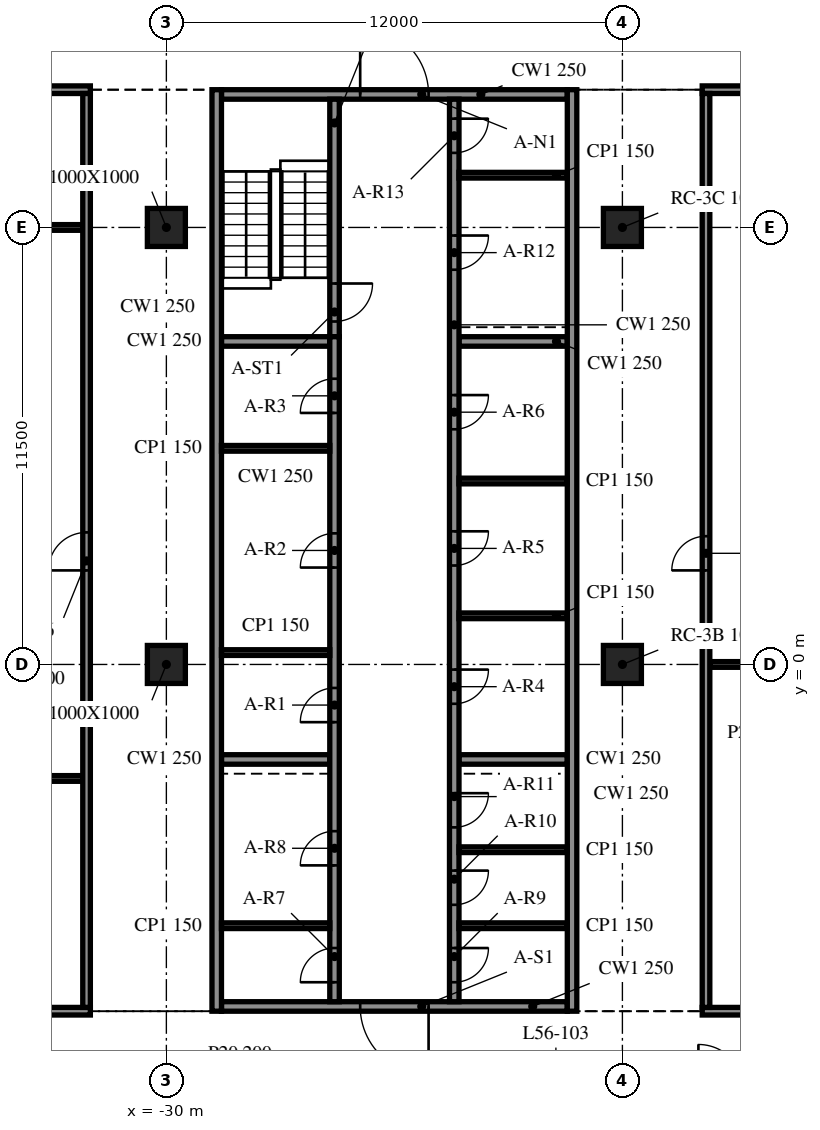
"""IFC4 building model, lengths in metres.
Left out: names, types, materials, properties, quantities, classifications, styles, units other than length and angle.
Written with IfcOpenShell. Run it as: python <this file> out.ifc"""

import sys

from ifc_helpers import new_model, si_unit, direction, frame, frame_2d, origin, origin_2d, place, context, subcontext, project, spatial, rectangle, extrude, element, fill, save


model = new_model("IFC4")
c1 = context("Model", 3, precision=1e-05, world=origin(), true_north=direction((0.0, 1.0)))
c2 = subcontext(c1, "Body", "Model", "MODEL_VIEW")
j1 = project(units=[si_unit("LENGTHUNIT", "METRE"), si_unit("PLANEANGLEUNIT", "RADIAN")], contexts=[c1])
p1 = place(None, origin())
s1 = spatial("IfcSite", under=j1, at=p1, CompositionType="ELEMENT")
p2 = place(p1, origin())
s2 = spatial("IfcBuilding", under=s1, at=p2, CompositionType="ELEMENT")
p3 = place(p2, frame((0.0, 0.0, 232.4)))
s3 = spatial("IfcBuildingStorey", under=s2, at=p3, CompositionType="ELEMENT", Elevation=232.4)
for number, where, z_axis, x_axis in (
    (1, (-30.0, 0.0, -0.34), (0.0, 0.0, 1.0), (1.0, 0.0, 0.0)),
    (2, (-30.0, 11.5, -0.34), (0.0, 0.0, 1.0), (1.0, 0.0, 0.0)),
    (3, (-18.0, 0.0, -0.34), (0.0, 0.0, 1.0), (1.0, 0.0, 0.0)),
    (4, (-18.0, 11.5, -0.34), (0.0, 0.0, 1.0), (1.0, 0.0, 0.0)),
):
    element("IfcColumn", number, at=place(p3, frame(where, z_axis=z_axis, x_axis=x_axis)), inside=s3, PredefinedType="COLUMN", context=c2, shape_type="SweptSolid", body=[
        extrude(rectangle(XDim=1.0, YDim=1.0, at=origin_2d()), origin(), (0.0, 0.0, 1.0), 3.8),
    ])
for number, where, z_axis, x_axis in (
    (5, (-28.675, 15.125, 0.0), (0.0, 0.0, 1.0), (0.0, -1.0, 0.0)),
    (6, (-19.325, -9.125, 0.0), (0.0, 0.0, 1.0), (0.0, 1.0, 0.0)),
):
    element("IfcWall", number, at=place(p3, frame(where, z_axis=z_axis, x_axis=x_axis)), inside=s3, PredefinedType="SOLIDWALL", context=c2, shape_type="SweptSolid", body=[
        extrude(rectangle(XDim=24.25, YDim=0.25, at=frame_2d((12.125, 0.0))), origin(), (0.0, 0.0, 1.0), 3.46),
    ])
p4 = place(p3, frame((-19.45, -9.0, 0.0), z_axis=(0.0, 0.0, 1.0), x_axis=(-1.0, 0.0, 0.0)))
e7 = element("IfcWall", 7, at=p4, inside=s3, PredefinedType="SOLIDWALL", context=c2, shape_type="SweptSolid", body=[
    extrude(rectangle(XDim=9.1, YDim=0.25, at=frame_2d((4.55, 0.0))), origin(), (0.0, 0.0, 1.0), 3.46),
])
p5 = place(p4, frame((3.65, 0.0, 0.0)))
e8 = element("IfcOpeningElement", 8, at=p5, cuts=e7, PredefinedType="OPENING", context=c2, shape_type="SweptSolid", body=[
    extrude(rectangle(XDim=1.8, YDim=2.1, at=frame_2d((0.9, 1.05))), frame((0.0, 0.135, 0.0), z_axis=(0.0, -1.0, 0.0), x_axis=(1.0, 0.0, 0.0)), (0.0, 0.0, 1.0), 0.27),
])
p6 = place(p3, frame((-28.55, 15.0, 0.0), z_axis=(0.0, 0.0, 1.0), x_axis=(1.0, 0.0, 0.0)))
e9 = element("IfcWall", 9, at=p6, inside=s3, PredefinedType="SOLIDWALL", context=c2, shape_type="SweptSolid", body=[
    extrude(rectangle(XDim=9.1, YDim=0.25, at=frame_2d((4.55, 0.0))), origin(), (0.0, 0.0, 1.0), 3.46),
])
p7 = place(p6, frame((3.65, 0.0, 0.0)))
e10 = element("IfcOpeningElement", 10, at=p7, cuts=e9, PredefinedType="OPENING", context=c2, shape_type="SweptSolid", body=[
    extrude(rectangle(XDim=1.8, YDim=2.1, at=frame_2d((0.9, 1.05))), frame((0.0, 0.135, 0.0), z_axis=(0.0, -1.0, 0.0), x_axis=(1.0, 0.0, 0.0)), (0.0, 0.0, 1.0), 0.27),
])
p8 = place(p3, frame((-25.575, -8.875, 0.0), z_axis=(0.0, 0.0, 1.0), x_axis=(0.0, 1.0, 0.0)))
e11 = element("IfcWall", 11, at=p8, inside=s3, PredefinedType="SOLIDWALL", context=c2, shape_type="SweptSolid", body=[
    extrude(rectangle(XDim=17.5, YDim=0.25, at=frame_2d((8.75, 0.0))), origin(), (0.0, 0.0, 1.0), 3.46),
])
p9 = place(p8, frame((7.356, 0.0, 0.0)))
e12 = element("IfcOpeningElement", 12, at=p9, cuts=e11, PredefinedType="OPENING", context=c2, shape_type="SweptSolid", body=[
    extrude(rectangle(XDim=0.9, YDim=2.1, at=frame_2d((0.45, 1.05))), frame((0.0, 0.135, 0.0), z_axis=(0.0, -1.0, 0.0), x_axis=(1.0, 0.0, 0.0)), (0.0, 0.0, 1.0), 0.27),
])
p10 = place(p8, frame((11.425, 0.0, 0.0)))
e13 = element("IfcOpeningElement", 13, at=p10, cuts=e11, PredefinedType="OPENING", context=c2, shape_type="SweptSolid", body=[
    extrude(rectangle(XDim=0.9, YDim=2.1, at=frame_2d((0.45, 1.05))), frame((0.0, 0.135, 0.0), z_axis=(0.0, -1.0, 0.0), x_axis=(1.0, 0.0, 0.0)), (0.0, 0.0, 1.0), 0.27),
])
p11 = place(p8, frame((15.494, 0.0, 0.0)))
e14 = element("IfcOpeningElement", 14, at=p11, cuts=e11, PredefinedType="OPENING", context=c2, shape_type="SweptSolid", body=[
    extrude(rectangle(XDim=0.9, YDim=2.1, at=frame_2d((0.45, 1.05))), frame((0.0, 0.135, 0.0), z_axis=(0.0, -1.0, 0.0), x_axis=(1.0, 0.0, 0.0)), (0.0, 0.0, 1.0), 0.27),
])
p12 = place(p8, frame((0.512, 0.0, 0.0)))
e15 = element("IfcOpeningElement", 15, at=p12, cuts=e11, PredefinedType="OPENING", context=c2, shape_type="SweptSolid", body=[
    extrude(rectangle(XDim=0.9, YDim=2.1, at=frame_2d((0.45, 1.05))), frame((0.0, 0.135, 0.0), z_axis=(0.0, -1.0, 0.0), x_axis=(1.0, 0.0, 0.0)), (0.0, 0.0, 1.0), 0.27),
])
p13 = place(p8, frame((3.587, 0.0, 0.0)))
e16 = element("IfcOpeningElement", 16, at=p13, cuts=e11, PredefinedType="OPENING", context=c2, shape_type="SweptSolid", body=[
    extrude(rectangle(XDim=0.9, YDim=2.1, at=frame_2d((0.45, 1.05))), frame((0.0, 0.135, 0.0), z_axis=(0.0, -1.0, 0.0), x_axis=(1.0, 0.0, 0.0)), (0.0, 0.0, 1.0), 0.27),
])
p14 = place(p3, frame((-25.575, 14.875, 0.0), z_axis=(0.0, 0.0, 1.0), x_axis=(0.0, -1.0, 0.0)))
e17 = element("IfcWall", 17, at=p14, inside=s3, PredefinedType="SOLIDWALL", context=c2, shape_type="SweptSolid", body=[
    extrude(rectangle(XDim=6.25, YDim=0.25, at=frame_2d((3.125, 0.0))), origin(), (0.0, 0.0, 1.0), 3.46),
])
p15 = place(p14, frame((4.85, 0.0, 0.0)))
e18 = element("IfcOpeningElement", 18, at=p15, cuts=e17, PredefinedType="OPENING", context=c2, shape_type="SweptSolid", body=[
    extrude(rectangle(XDim=1.0, YDim=2.1, at=frame_2d((0.5, 1.05))), frame((0.0, 0.135, 0.0), z_axis=(0.0, -1.0, 0.0), x_axis=(1.0, 0.0, 0.0)), (0.0, 0.0, 1.0), 0.27),
])
p16 = place(p3, frame((-22.425, 14.875, 0.0), z_axis=(0.0, 0.0, 1.0), x_axis=(0.0, -1.0, 0.0)))
e19 = element("IfcWall", 19, at=p16, inside=s3, PredefinedType="SOLIDWALL", context=c2, shape_type="SweptSolid", body=[
    extrude(rectangle(XDim=23.75, YDim=0.25, at=frame_2d((11.875, 0.0))), origin(), (0.0, 0.0, 1.0), 3.46),
])
p17 = place(p16, frame((15.01, 0.0, 0.0)))
e20 = element("IfcOpeningElement", 20, at=p17, cuts=e19, PredefinedType="OPENING", context=c2, shape_type="SweptSolid", body=[
    extrude(rectangle(XDim=0.9, YDim=2.1, at=frame_2d((0.45, 1.05))), frame((0.0, 0.135, 0.0), z_axis=(0.0, -1.0, 0.0), x_axis=(1.0, 0.0, 0.0)), (0.0, 0.0, 1.0), 0.27),
])
p18 = place(p16, frame((11.371, 0.0, 0.0)))
e21 = element("IfcOpeningElement", 21, at=p18, cuts=e19, PredefinedType="OPENING", context=c2, shape_type="SweptSolid", body=[
    extrude(rectangle(XDim=0.9, YDim=2.1, at=frame_2d((0.45, 1.05))), frame((0.0, 0.135, 0.0), z_axis=(0.0, -1.0, 0.0), x_axis=(1.0, 0.0, 0.0)), (0.0, 0.0, 1.0), 0.27),
])
p19 = place(p16, frame((7.786, 0.0, 0.0)))
e22 = element("IfcOpeningElement", 22, at=p19, cuts=e19, PredefinedType="OPENING", context=c2, shape_type="SweptSolid", body=[
    extrude(rectangle(XDim=0.9, YDim=2.1, at=frame_2d((0.45, 1.05))), frame((0.0, 0.135, 0.0), z_axis=(0.0, -1.0, 0.0), x_axis=(1.0, 0.0, 0.0)), (0.0, 0.0, 1.0), 0.27),
])
p20 = place(p16, frame((22.337, 0.0, 0.0)))
e23 = element("IfcOpeningElement", 23, at=p20, cuts=e19, PredefinedType="OPENING", context=c2, shape_type="SweptSolid", body=[
    extrude(rectangle(XDim=0.9, YDim=2.1, at=frame_2d((0.45, 1.05))), frame((0.0, 0.135, 0.0), z_axis=(0.0, -1.0, 0.0), x_axis=(1.0, 0.0, 0.0)), (0.0, 0.0, 1.0), 0.27),
])
p21 = place(p16, frame((20.3, 0.0, 0.0)))
e24 = element("IfcOpeningElement", 24, at=p21, cuts=e19, PredefinedType="OPENING", context=c2, shape_type="SweptSolid", body=[
    extrude(rectangle(XDim=0.9, YDim=2.1, at=frame_2d((0.45, 1.05))), frame((0.0, 0.135, 0.0), z_axis=(0.0, -1.0, 0.0), x_axis=(1.0, 0.0, 0.0)), (0.0, 0.0, 1.0), 0.27),
])
p22 = place(p16, frame((18.262, 0.0, 0.0)))
e25 = element("IfcOpeningElement", 25, at=p22, cuts=e19, PredefinedType="OPENING", context=c2, shape_type="SweptSolid", body=[
    extrude(rectangle(XDim=0.9, YDim=2.1, at=frame_2d((0.45, 1.05))), frame((0.0, 0.135, 0.0), z_axis=(0.0, -1.0, 0.0), x_axis=(1.0, 0.0, 0.0)), (0.0, 0.0, 1.0), 0.27),
])
p23 = place(p16, frame((3.587, 0.0, 0.0)))
e26 = element("IfcOpeningElement", 26, at=p23, cuts=e19, PredefinedType="OPENING", context=c2, shape_type="SweptSolid", body=[
    extrude(rectangle(XDim=0.9, YDim=2.1, at=frame_2d((0.45, 1.05))), frame((0.0, 0.135, 0.0), z_axis=(0.0, -1.0, 0.0), x_axis=(1.0, 0.0, 0.0)), (0.0, 0.0, 1.0), 0.27),
])
p24 = place(p16, frame((0.512, 0.0, 0.0)))
e27 = element("IfcOpeningElement", 27, at=p24, cuts=e19, PredefinedType="OPENING", context=c2, shape_type="SweptSolid", body=[
    extrude(rectangle(XDim=0.9, YDim=2.1, at=frame_2d((0.45, 1.05))), frame((0.0, 0.135, 0.0), z_axis=(0.0, -1.0, 0.0), x_axis=(1.0, 0.0, 0.0)), (0.0, 0.0, 1.0), 0.27),
])
for number, where, z_axis, x_axis in (
    (28, (-28.55, -2.5, 0.0), (0.0, 0.0, 1.0), (1.0, 0.0, 0.0)),
    (29, (-28.55, 8.5, 0.0), (0.0, 0.0, 1.0), (1.0, 0.0, 0.0)),
    (30, (-22.3, -2.5, 0.0), (0.0, 0.0, 1.0), (1.0, 0.0, 0.0)),
    (31, (-22.3, 8.5, 0.0), (0.0, 0.0, 1.0), (1.0, 0.0, 0.0)),
):
    element("IfcWall", number, at=place(p3, frame(where, z_axis=z_axis, x_axis=x_axis)), inside=s3, PredefinedType="SOLIDWALL", context=c2, shape_type="SweptSolid", body=[
        extrude(rectangle(XDim=2.85, YDim=0.25, at=frame_2d((1.425, 0.0))), origin(), (0.0, 0.0, 1.0), 3.46),
    ])
for number, where, z_axis, x_axis in (
    (32, (-28.55, 0.312, 0.0), (0.0, 0.0, 1.0), (1.0, 0.0, 0.0)),
    (33, (-28.55, 5.688, 0.0), (0.0, 0.0, 1.0), (1.0, 0.0, 0.0)),
    (34, (-22.3, 1.28, 0.0), (0.0, 0.0, 1.0), (1.0, 0.0, 0.0)),
    (35, (-22.3, 4.827, 0.0), (0.0, 0.0, 1.0), (1.0, 0.0, 0.0)),
    (36, (-28.55, -6.875, 0.0), (0.0, 0.0, 1.0), (1.0, 0.0, 0.0)),
    (37, (-22.3, -6.875, 0.0), (0.0, 0.0, 1.0), (1.0, 0.0, 0.0)),
    (38, (-22.3, -4.875, 0.0), (0.0, 0.0, 1.0), (1.0, 0.0, 0.0)),
    (39, (-22.3, 12.875, 0.0), (0.0, 0.0, 1.0), (1.0, 0.0, 0.0)),
):
    element("IfcWall", number, at=place(p3, frame(where, z_axis=z_axis, x_axis=x_axis)), inside=s3, PredefinedType="PARTITIONING", context=c2, shape_type="SweptSolid", body=[
        extrude(rectangle(XDim=2.85, YDim=0.15, at=frame_2d((1.425, 0.0))), origin(), (0.0, 0.0, 1.0), 3.46),
    ])
p25 = place(p3, frame((-41.975, -9.125, 0.0), z_axis=(0.0, 0.0, 1.0), x_axis=(1.0, 0.0, 0.0)))
e40 = element("IfcWall", 40, at=p25, inside=s3, PredefinedType="PARTITIONING", context=c2, shape_type="SweptSolid", body=[
    extrude(rectangle(XDim=9.975, YDim=0.2, at=frame_2d((4.988, 0.0))), origin(), (0.0, 0.0, 1.0), 3.46),
])
p26 = place(p25, frame((4.5, 0.0, 0.0)))
e41 = element("IfcOpeningElement", 41, at=p26, cuts=e40, PredefinedType="OPENING", context=c2, shape_type="SweptSolid", body=[
    extrude(rectangle(XDim=1.0, YDim=2.1, at=frame_2d((0.5, 1.05))), frame((0.0, 0.11, 0.0), z_axis=(0.0, -1.0, 0.0), x_axis=(1.0, 0.0, 0.0)), (0.0, 0.0, 1.0), 0.22),
])
p27 = place(p3, frame((-15.9, -9.125, 0.0), z_axis=(0.0, 0.0, 1.0), x_axis=(1.0, 0.0, 0.0)))
e42 = element("IfcWall", 42, at=p27, inside=s3, PredefinedType="PARTITIONING", context=c2, shape_type="SweptSolid", body=[
    extrude(rectangle(XDim=7.7, YDim=0.2, at=frame_2d((3.85, 0.0))), origin(), (0.0, 0.0, 1.0), 3.46),
])
p28 = place(p27, frame((3.3, 0.0, 0.0)))
e43 = element("IfcOpeningElement", 43, at=p28, cuts=e42, PredefinedType="OPENING", context=c2, shape_type="SweptSolid", body=[
    extrude(rectangle(XDim=0.9, YDim=2.1, at=frame_2d((0.45, 1.05))), frame((0.0, 0.11, 0.0), z_axis=(0.0, -1.0, 0.0), x_axis=(1.0, 0.0, 0.0)), (0.0, 0.0, 1.0), 0.22),
])
p29 = place(p3, frame((-41.975, -3.0, 0.0), z_axis=(0.0, 0.0, 1.0), x_axis=(1.0, 0.0, 0.0)))
e44 = element("IfcWall", 44, at=p29, inside=s3, PredefinedType="PARTITIONING", context=c2, shape_type="SweptSolid", body=[
    extrude(rectangle(XDim=9.775, YDim=0.15, at=frame_2d((4.888, 0.0))), origin(), (0.0, 0.0, 1.0), 3.46),
])
p30 = place(p3, frame((-15.7, 0.0, 0.0), z_axis=(0.0, 0.0, 1.0), x_axis=(1.0, 0.0, 0.0)))
e45 = element("IfcWall", 45, at=p30, inside=s3, PredefinedType="PARTITIONING", context=c2, shape_type="SweptSolid", body=[
    extrude(rectangle(XDim=7.3, YDim=0.15, at=frame_2d((3.65, 0.0))), origin(), (0.0, 0.0, 1.0), 3.46),
])
p31 = place(p3, frame((-41.5, 11.5, 0.0), z_axis=(0.0, 0.0, 1.0), x_axis=(1.0, 0.0, 0.0)))
e46 = element("IfcWall", 46, at=p31, inside=s3, PredefinedType="PARTITIONING", context=c2, shape_type="SweptSolid", body=[
    extrude(rectangle(XDim=9.3, YDim=0.15, at=frame_2d((4.65, 0.0))), origin(), (0.0, 0.0, 1.0), 3.46),
])
p32 = place(p3, frame((-41.975, 15.125, 0.0), z_axis=(0.0, 0.0, 1.0), x_axis=(1.0, 0.0, 0.0)))
e47 = element("IfcWall", 47, at=p32, inside=s3, PredefinedType="PARTITIONING", context=c2, shape_type="SweptSolid", body=[
    extrude(rectangle(XDim=9.975, YDim=0.2, at=frame_2d((4.988, 0.0))), origin(), (0.0, 0.0, 1.0), 3.46),
])
p33 = place(p32, frame((4.5, 0.0, 0.0)))
e48 = element("IfcOpeningElement", 48, at=p33, cuts=e47, PredefinedType="OPENING", context=c2, shape_type="SweptSolid", body=[
    extrude(rectangle(XDim=0.9, YDim=2.1, at=frame_2d((0.45, 1.05))), frame((0.0, 0.11, 0.0), z_axis=(0.0, -1.0, 0.0), x_axis=(1.0, 0.0, 0.0)), (0.0, 0.0, 1.0), 0.22),
])
p34 = place(p3, frame((-15.9, 15.125, 0.0), z_axis=(0.0, 0.0, 1.0), x_axis=(1.0, 0.0, 0.0)))
e49 = element("IfcWall", 49, at=p34, inside=s3, PredefinedType="PARTITIONING", context=c2, shape_type="SweptSolid", body=[
    extrude(rectangle(XDim=7.7, YDim=0.2, at=frame_2d((3.85, 0.0))), origin(), (0.0, 0.0, 1.0), 3.46),
])
p35 = place(p3, frame((-32.1, -9.025, 0.0), z_axis=(0.0, 0.0, 1.0), x_axis=(0.0, 1.0, 0.0)))
e50 = element("IfcWall", 50, at=p35, inside=s3, PredefinedType="PARTITIONING", context=c2, shape_type="SweptSolid", body=[
    extrude(rectangle(XDim=24.05, YDim=0.2, at=frame_2d((12.025, 0.0))), origin(), (0.0, 0.0, 1.0), 3.46),
])
p36 = place(p35, frame((11.5, 0.0, 0.0)))
e51 = element("IfcOpeningElement", 51, at=p36, cuts=e50, PredefinedType="OPENING", context=c2, shape_type="SweptSolid", body=[
    extrude(rectangle(XDim=1.0, YDim=2.1, at=frame_2d((0.5, 1.05))), frame((0.0, 0.11, 0.0), z_axis=(0.0, -1.0, 0.0), x_axis=(1.0, 0.0, 0.0)), (0.0, 0.0, 1.0), 0.22),
])
p37 = place(p3, frame((-15.8, -9.025, 0.0), z_axis=(0.0, 0.0, 1.0), x_axis=(0.0, 1.0, 0.0)))
e52 = element("IfcWall", 52, at=p37, inside=s3, PredefinedType="PARTITIONING", context=c2, shape_type="SweptSolid", body=[
    extrude(rectangle(XDim=24.05, YDim=0.2, at=frame_2d((12.025, 0.0))), origin(), (0.0, 0.0, 1.0), 3.46),
])
p38 = place(p37, frame((11.5, 0.0, 0.0)))
e53 = element("IfcOpeningElement", 53, at=p38, cuts=e52, PredefinedType="OPENING", context=c2, shape_type="SweptSolid", body=[
    extrude(rectangle(XDim=0.9, YDim=2.1, at=frame_2d((0.45, 1.05))), frame((0.0, 0.11, 0.0), z_axis=(0.0, -1.0, 0.0), x_axis=(1.0, 0.0, 0.0)), (0.0, 0.0, 1.0), 0.22),
])
p39 = place(p5, origin())
e54 = element("IfcDoor", 54, at=p39, inside=s3, OperationType="DOUBLE_DOOR_SINGLE_SWING", PredefinedType="DOOR", context=c2, shape_type="SweptSolid", body=[
    extrude(rectangle(XDim=1.8, YDim=2.1, at=frame_2d((0.9, 1.05))), frame((0.0, 0.025, 0.0), z_axis=(0.0, -1.0, 0.0), x_axis=(1.0, 0.0, 0.0)), (0.0, 0.0, 1.0), 0.05),
])
fill(e8, e54)
p40 = place(p7, origin())
e55 = element("IfcDoor", 55, at=p40, inside=s3, OperationType="DOUBLE_DOOR_SINGLE_SWING", PredefinedType="DOOR", context=c2, shape_type="SweptSolid", body=[
    extrude(rectangle(XDim=1.8, YDim=2.1, at=frame_2d((0.9, 1.05))), frame((0.0, 0.025, 0.0), z_axis=(0.0, -1.0, 0.0), x_axis=(1.0, 0.0, 0.0)), (0.0, 0.0, 1.0), 0.05),
])
fill(e10, e55)
p41 = place(p9, origin())
e56 = element("IfcDoor", 56, at=p41, inside=s3, OperationType="SINGLE_SWING_LEFT", PredefinedType="DOOR", context=c2, shape_type="SweptSolid", body=[
    extrude(rectangle(XDim=0.9, YDim=2.1, at=frame_2d((0.45, 1.05))), frame((0.0, 0.025, 0.0), z_axis=(0.0, -1.0, 0.0), x_axis=(1.0, 0.0, 0.0)), (0.0, 0.0, 1.0), 0.05),
])
fill(e12, e56)
p42 = place(p10, origin())
e57 = element("IfcDoor", 57, at=p42, inside=s3, OperationType="SINGLE_SWING_RIGHT", PredefinedType="DOOR", context=c2, shape_type="SweptSolid", body=[
    extrude(rectangle(XDim=0.9, YDim=2.1, at=frame_2d((0.45, 1.05))), frame((0.0, 0.025, 0.0), z_axis=(0.0, -1.0, 0.0), x_axis=(1.0, 0.0, 0.0)), (0.0, 0.0, 1.0), 0.05),
])
fill(e13, e57)
p43 = place(p11, origin())
e58 = element("IfcDoor", 58, at=p43, inside=s3, OperationType="SINGLE_SWING_LEFT", PredefinedType="DOOR", context=c2, shape_type="SweptSolid", body=[
    extrude(rectangle(XDim=0.9, YDim=2.1, at=frame_2d((0.45, 1.05))), frame((0.0, 0.025, 0.0), z_axis=(0.0, -1.0, 0.0), x_axis=(1.0, 0.0, 0.0)), (0.0, 0.0, 1.0), 0.05),
])
fill(e14, e58)
p44 = place(p17, origin())
e59 = element("IfcDoor", 59, at=p44, inside=s3, OperationType="SINGLE_SWING_RIGHT", PredefinedType="DOOR", context=c2, shape_type="SweptSolid", body=[
    extrude(rectangle(XDim=0.9, YDim=2.1, at=frame_2d((0.45, 1.05))), frame((0.0, 0.025, 0.0), z_axis=(0.0, -1.0, 0.0), x_axis=(1.0, 0.0, 0.0)), (0.0, 0.0, 1.0), 0.05),
])
fill(e20, e59)
p45 = place(p18, origin())
e60 = element("IfcDoor", 60, at=p45, inside=s3, OperationType="SINGLE_SWING_LEFT", PredefinedType="DOOR", context=c2, shape_type="SweptSolid", body=[
    extrude(rectangle(XDim=0.9, YDim=2.1, at=frame_2d((0.45, 1.05))), frame((0.0, 0.025, 0.0), z_axis=(0.0, -1.0, 0.0), x_axis=(1.0, 0.0, 0.0)), (0.0, 0.0, 1.0), 0.05),
])
fill(e21, e60)
p46 = place(p19, origin())
e61 = element("IfcDoor", 61, at=p46, inside=s3, OperationType="SINGLE_SWING_RIGHT", PredefinedType="DOOR", context=c2, shape_type="SweptSolid", body=[
    extrude(rectangle(XDim=0.9, YDim=2.1, at=frame_2d((0.45, 1.05))), frame((0.0, 0.025, 0.0), z_axis=(0.0, -1.0, 0.0), x_axis=(1.0, 0.0, 0.0)), (0.0, 0.0, 1.0), 0.05),
])
fill(e22, e61)
p47 = place(p12, origin())
e62 = element("IfcDoor", 62, at=p47, inside=s3, OperationType="SINGLE_SWING_LEFT", PredefinedType="DOOR", context=c2, shape_type="SweptSolid", body=[
    extrude(rectangle(XDim=0.9, YDim=2.1, at=frame_2d((0.45, 1.05))), frame((0.0, 0.025, 0.0), z_axis=(0.0, -1.0, 0.0), x_axis=(1.0, 0.0, 0.0)), (0.0, 0.0, 1.0), 0.05),
])
fill(e15, e62)
p48 = place(p13, origin())
e63 = element("IfcDoor", 63, at=p48, inside=s3, OperationType="SINGLE_SWING_RIGHT", PredefinedType="DOOR", context=c2, shape_type="SweptSolid", body=[
    extrude(rectangle(XDim=0.9, YDim=2.1, at=frame_2d((0.45, 1.05))), frame((0.0, 0.025, 0.0), z_axis=(0.0, -1.0, 0.0), x_axis=(1.0, 0.0, 0.0)), (0.0, 0.0, 1.0), 0.05),
])
fill(e16, e63)
p49 = place(p20, origin())
e64 = element("IfcDoor", 64, at=p49, inside=s3, OperationType="SINGLE_SWING_LEFT", PredefinedType="DOOR", context=c2, shape_type="SweptSolid", body=[
    extrude(rectangle(XDim=0.9, YDim=2.1, at=frame_2d((0.45, 1.05))), frame((0.0, 0.025, 0.0), z_axis=(0.0, -1.0, 0.0), x_axis=(1.0, 0.0, 0.0)), (0.0, 0.0, 1.0), 0.05),
])
fill(e23, e64)
p50 = place(p21, origin())
e65 = element("IfcDoor", 65, at=p50, inside=s3, OperationType="SINGLE_SWING_RIGHT", PredefinedType="DOOR", context=c2, shape_type="SweptSolid", body=[
    extrude(rectangle(XDim=0.9, YDim=2.1, at=frame_2d((0.45, 1.05))), frame((0.0, 0.025, 0.0), z_axis=(0.0, -1.0, 0.0), x_axis=(1.0, 0.0, 0.0)), (0.0, 0.0, 1.0), 0.05),
])
fill(e24, e65)
p51 = place(p22, origin())
e66 = element("IfcDoor", 66, at=p51, inside=s3, OperationType="SINGLE_SWING_LEFT", PredefinedType="DOOR", context=c2, shape_type="SweptSolid", body=[
    extrude(rectangle(XDim=0.9, YDim=2.1, at=frame_2d((0.45, 1.05))), frame((0.0, 0.025, 0.0), z_axis=(0.0, -1.0, 0.0), x_axis=(1.0, 0.0, 0.0)), (0.0, 0.0, 1.0), 0.05),
])
fill(e25, e66)
p52 = place(p23, origin())
e67 = element("IfcDoor", 67, at=p52, inside=s3, OperationType="SINGLE_SWING_RIGHT", PredefinedType="DOOR", context=c2, shape_type="SweptSolid", body=[
    extrude(rectangle(XDim=0.9, YDim=2.1, at=frame_2d((0.45, 1.05))), frame((0.0, 0.025, 0.0), z_axis=(0.0, -1.0, 0.0), x_axis=(1.0, 0.0, 0.0)), (0.0, 0.0, 1.0), 0.05),
])
fill(e26, e67)
p53 = place(p24, origin())
e68 = element("IfcDoor", 68, at=p53, inside=s3, OperationType="SINGLE_SWING_LEFT", PredefinedType="DOOR", context=c2, shape_type="SweptSolid", body=[
    extrude(rectangle(XDim=0.9, YDim=2.1, at=frame_2d((0.45, 1.05))), frame((0.0, 0.025, 0.0), z_axis=(0.0, -1.0, 0.0), x_axis=(1.0, 0.0, 0.0)), (0.0, 0.0, 1.0), 0.05),
])
fill(e27, e68)
p54 = place(p15, origin())
e69 = element("IfcDoor", 69, at=p54, inside=s3, OperationType="SINGLE_SWING_RIGHT", PredefinedType="DOOR", context=c2, shape_type="SweptSolid", body=[
    extrude(rectangle(XDim=1.0, YDim=2.1, at=frame_2d((0.5, 1.05))), frame((0.0, 0.025, 0.0), z_axis=(0.0, -1.0, 0.0), x_axis=(1.0, 0.0, 0.0)), (0.0, 0.0, 1.0), 0.05),
])
fill(e18, e69)
p55 = place(p36, origin())
e70 = element("IfcDoor", 70, at=p55, inside=s3, OperationType="SINGLE_SWING_LEFT", PredefinedType="DOOR", context=c2, shape_type="SweptSolid", body=[
    extrude(rectangle(XDim=1.0, YDim=2.1, at=frame_2d((0.5, 1.05))), frame((0.0, 0.025, 0.0), z_axis=(0.0, -1.0, 0.0), x_axis=(1.0, 0.0, 0.0)), (0.0, 0.0, 1.0), 0.05),
])
fill(e51, e70)
p56 = place(p38, origin())
e71 = element("IfcDoor", 71, at=p56, inside=s3, OperationType="SINGLE_SWING_RIGHT", PredefinedType="DOOR", context=c2, shape_type="SweptSolid", body=[
    extrude(rectangle(XDim=0.9, YDim=2.1, at=frame_2d((0.45, 1.05))), frame((0.0, 0.025, 0.0), z_axis=(0.0, -1.0, 0.0), x_axis=(1.0, 0.0, 0.0)), (0.0, 0.0, 1.0), 0.05),
])
fill(e53, e71)
save(model, sys.argv[1])
